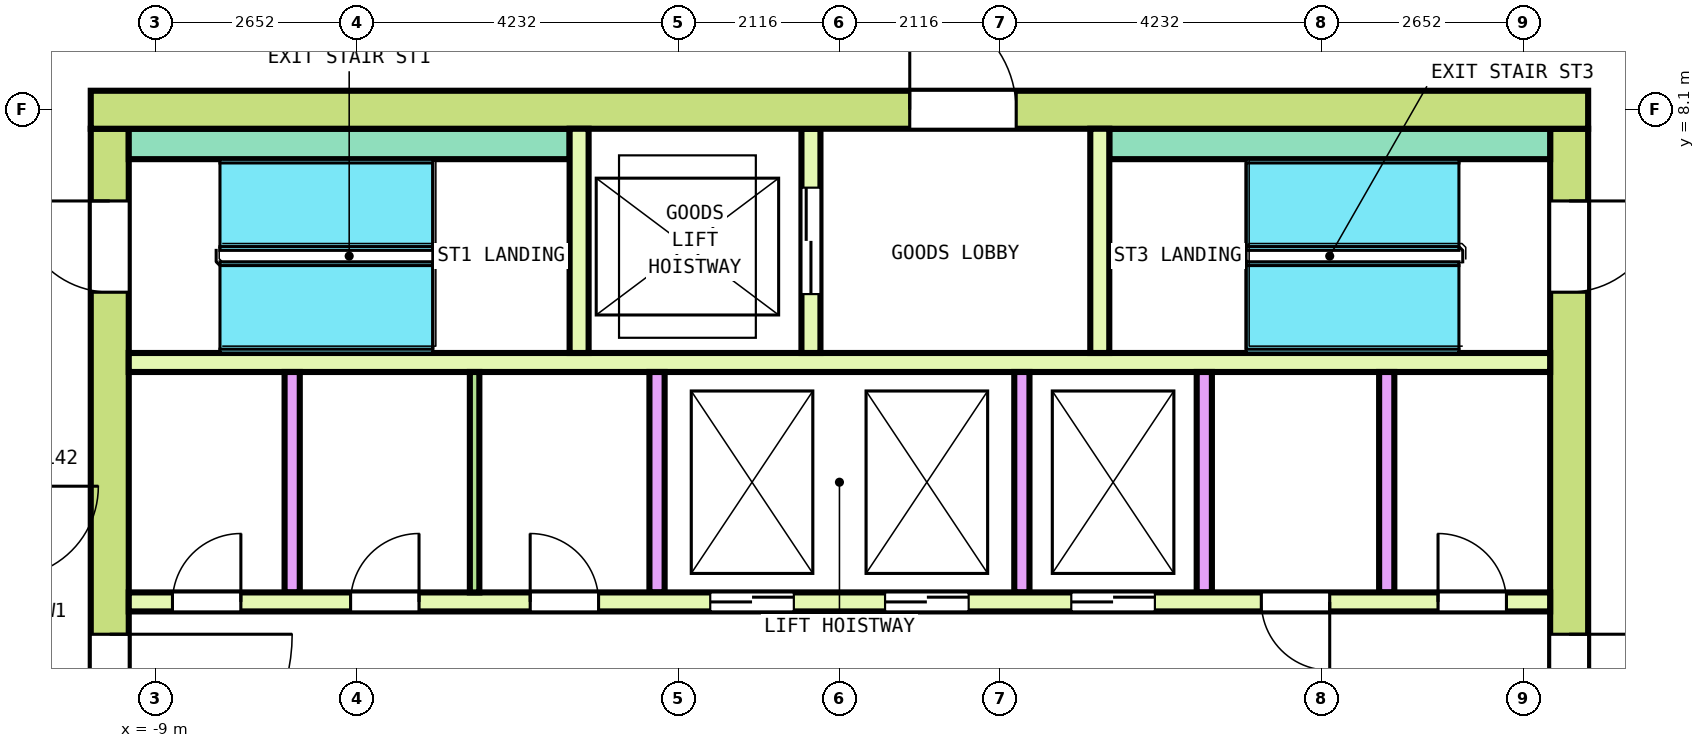
"""IFC4 building model, lengths in metres.
Left out: names, types, materials, properties, quantities, classifications, styles, units other than length and angle.
Written with IfcOpenShell. Run it as: python <this file> out.ifc"""

import sys

from ifc_helpers import new_model, si_unit, direction, frame, frame_2d, origin, place, context, subcontext, project, spatial, rectangle, extrude, element, fill, save


model = new_model("IFC4")
c1 = context("Model", 3, precision=1e-05, world=origin(), true_north=direction((0.0, 1.0)))
c2 = subcontext(c1, "Body", "Model", "MODEL_VIEW")
j1 = project(units=[si_unit("LENGTHUNIT", "METRE"), si_unit("PLANEANGLEUNIT", "RADIAN")], contexts=[c1])
p1 = place(None, origin())
s1 = spatial("IfcSite", under=j1, at=p1, CompositionType="ELEMENT")
p2 = place(p1, origin())
s2 = spatial("IfcBuilding", under=s1, at=p2, CompositionType="ELEMENT")
p3 = place(p2, frame((0.0, 0.0, 271.0)))
s3 = spatial("IfcBuildingStorey", under=s2, at=p3, CompositionType="ELEMENT", Elevation=271.0)
p4 = place(p3, frame((-9.85, 8.1, 0.0), z_axis=(0.0, 0.0, 1.0), x_axis=(1.0, 0.0, 0.0)))
e1 = element("IfcWall", 1, at=p4, inside=s3, PredefinedType="SHEAR", context=c2, shape_type="SweptSolid", body=[
    extrude(rectangle(XDim=19.7, YDim=0.5, at=frame_2d((9.85, 0.0))), origin(), (0.0, 0.0, 1.0), 3.7),
])
p5 = place(p4, frame((10.775, 0.0, 0.0)))
e2 = element("IfcOpeningElement", 2, at=p5, cuts=e1, PredefinedType="OPENING", context=c2, shape_type="SweptSolid", body=[
    extrude(rectangle(XDim=1.4, YDim=2.1, at=frame_2d((0.7, 1.05))), frame((0.0, 0.26, 0.0), z_axis=(0.0, -1.0, 0.0), x_axis=(1.0, 0.0, 0.0)), (0.0, 0.0, 1.0), 0.52),
])
p6 = place(p3, frame((-9.6, -7.85, 0.0), z_axis=(0.0, 0.0, 1.0), x_axis=(0.0, 1.0, 0.0)))
e3 = element("IfcWall", 3, at=p6, inside=s3, PredefinedType="SHEAR", context=c2, shape_type="SweptSolid", body=[
    extrude(rectangle(XDim=15.7, YDim=0.5, at=frame_2d((7.85, 0.0))), origin(), (0.0, 0.0, 1.0), 3.7),
])
p7 = place(p6, frame((6.65, 0.0, 0.0)))
e4 = element("IfcOpeningElement", 4, at=p7, cuts=e3, PredefinedType="OPENING", context=c2, shape_type="SweptSolid", body=[
    extrude(rectangle(XDim=2.4, YDim=2.1, at=frame_2d((1.2, 1.05))), frame((0.0, 0.26, 0.0), z_axis=(0.0, -1.0, 0.0), x_axis=(1.0, 0.0, 0.0)), (0.0, 0.0, 1.0), 0.52),
])
p8 = place(p6, frame((13.55, 0.0, 0.0)))
e5 = element("IfcOpeningElement", 5, at=p8, cuts=e3, PredefinedType="OPENING", context=c2, shape_type="SweptSolid", body=[
    extrude(rectangle(XDim=1.2, YDim=2.1, at=frame_2d((0.6, 1.05))), frame((0.0, 0.26, 0.0), z_axis=(0.0, -1.0, 0.0), x_axis=(1.0, 0.0, 0.0)), (0.0, 0.0, 1.0), 0.52),
])
p9 = place(p6, frame((0.95, 0.0, 0.0)))
e6 = element("IfcOpeningElement", 6, at=p9, cuts=e3, PredefinedType="OPENING", context=c2, shape_type="SweptSolid", body=[
    extrude(rectangle(XDim=1.2, YDim=2.1, at=frame_2d((0.6, 1.05))), frame((0.0, 0.26, 0.0), z_axis=(0.0, -1.0, 0.0), x_axis=(1.0, 0.0, 0.0)), (0.0, 0.0, 1.0), 0.52),
])
p10 = place(p3, frame((9.6, -7.85, 0.0), z_axis=(0.0, 0.0, 1.0), x_axis=(0.0, 1.0, 0.0)))
e7 = element("IfcWall", 7, at=p10, inside=s3, PredefinedType="SHEAR", context=c2, shape_type="SweptSolid", body=[
    extrude(rectangle(XDim=15.7, YDim=0.5, at=frame_2d((7.85, 0.0))), origin(), (0.0, 0.0, 1.0), 3.7),
])
p11 = place(p10, frame((6.65, 0.0, 0.0)))
e8 = element("IfcOpeningElement", 8, at=p11, cuts=e7, PredefinedType="OPENING", context=c2, shape_type="SweptSolid", body=[
    extrude(rectangle(XDim=2.4, YDim=2.1, at=frame_2d((1.2, 1.05))), frame((0.0, 0.26, 0.0), z_axis=(0.0, -1.0, 0.0), x_axis=(1.0, 0.0, 0.0)), (0.0, 0.0, 1.0), 0.52),
])
p12 = place(p10, frame((13.55, 0.0, 0.0)))
e9 = element("IfcOpeningElement", 9, at=p12, cuts=e7, PredefinedType="OPENING", context=c2, shape_type="SweptSolid", body=[
    extrude(rectangle(XDim=1.2, YDim=2.1, at=frame_2d((0.6, 1.05))), frame((0.0, 0.26, 0.0), z_axis=(0.0, -1.0, 0.0), x_axis=(1.0, 0.0, 0.0)), (0.0, 0.0, 1.0), 0.52),
])
p13 = place(p10, frame((1.05, 0.0, 0.0)))
e10 = element("IfcOpeningElement", 10, at=p13, cuts=e7, PredefinedType="OPENING", context=c2, shape_type="SweptSolid", body=[
    extrude(rectangle(XDim=1.0, YDim=2.1, at=frame_2d((0.5, 1.05))), frame((0.0, 0.26, 0.0), z_axis=(0.0, -1.0, 0.0), x_axis=(1.0, 0.0, 0.0)), (0.0, 0.0, 1.0), 0.52),
])
p14 = place(p3, frame((-9.35, 1.625, 0.0), z_axis=(0.0, 0.0, 1.0), x_axis=(1.0, 0.0, 0.0)))
e11 = element("IfcWall", 11, at=p14, inside=s3, PredefinedType="SOLIDWALL", context=c2, shape_type="SweptSolid", body=[
    extrude(rectangle(XDim=18.7, YDim=0.25, at=frame_2d((9.35, 0.0))), origin(), (0.0, 0.0, 1.0), 3.7),
])
p15 = place(p14, frame((7.65, 0.0, 0.0)))
e12 = element("IfcOpeningElement", 12, at=p15, cuts=e11, PredefinedType="OPENING", context=c2, shape_type="SweptSolid", body=[
    extrude(rectangle(XDim=1.1, YDim=2.1, at=frame_2d((0.55, 1.05))), frame((0.0, 0.135, 0.0), z_axis=(0.0, -1.0, 0.0), x_axis=(1.0, 0.0, 0.0)), (0.0, 0.0, 1.0), 0.27),
])
p16 = place(p14, frame((9.95, 0.0, 0.0)))
e13 = element("IfcOpeningElement", 13, at=p16, cuts=e11, PredefinedType="OPENING", context=c2, shape_type="SweptSolid", body=[
    extrude(rectangle(XDim=1.1, YDim=2.1, at=frame_2d((0.55, 1.05))), frame((0.0, 0.135, 0.0), z_axis=(0.0, -1.0, 0.0), x_axis=(1.0, 0.0, 0.0)), (0.0, 0.0, 1.0), 0.27),
])
p17 = place(p14, frame((12.4, 0.0, 0.0)))
e14 = element("IfcOpeningElement", 14, at=p17, cuts=e11, PredefinedType="OPENING", context=c2, shape_type="SweptSolid", body=[
    extrude(rectangle(XDim=1.1, YDim=2.1, at=frame_2d((0.55, 1.05))), frame((0.0, 0.135, 0.0), z_axis=(0.0, -1.0, 0.0), x_axis=(1.0, 0.0, 0.0)), (0.0, 0.0, 1.0), 0.27),
])
p18 = place(p14, frame((0.575, 0.0, 0.0)))
e15 = element("IfcOpeningElement", 15, at=p18, cuts=e11, PredefinedType="OPENING", context=c2, shape_type="SweptSolid", body=[
    extrude(rectangle(XDim=0.9, YDim=2.1, at=frame_2d((0.45, 1.05))), frame((0.0, 0.135, 0.0), z_axis=(0.0, -1.0, 0.0), x_axis=(1.0, 0.0, 0.0)), (0.0, 0.0, 1.0), 0.27),
])
p19 = place(p14, frame((2.919, 0.0, 0.0)))
e16 = element("IfcOpeningElement", 16, at=p19, cuts=e11, PredefinedType="OPENING", context=c2, shape_type="SweptSolid", body=[
    extrude(rectangle(XDim=0.9, YDim=2.1, at=frame_2d((0.45, 1.05))), frame((0.0, 0.135, 0.0), z_axis=(0.0, -1.0, 0.0), x_axis=(1.0, 0.0, 0.0)), (0.0, 0.0, 1.0), 0.27),
])
p20 = place(p14, frame((5.281, 0.0, 0.0)))
e17 = element("IfcOpeningElement", 17, at=p20, cuts=e11, PredefinedType="OPENING", context=c2, shape_type="SweptSolid", body=[
    extrude(rectangle(XDim=0.9, YDim=2.1, at=frame_2d((0.45, 1.05))), frame((0.0, 0.135, 0.0), z_axis=(0.0, -1.0, 0.0), x_axis=(1.0, 0.0, 0.0)), (0.0, 0.0, 1.0), 0.27),
])
p21 = place(p14, frame((14.9, 0.0, 0.0)))
e18 = element("IfcOpeningElement", 18, at=p21, cuts=e11, PredefinedType="OPENING", context=c2, shape_type="SweptSolid", body=[
    extrude(rectangle(XDim=0.9, YDim=2.1, at=frame_2d((0.45, 1.05))), frame((0.0, 0.135, 0.0), z_axis=(0.0, -1.0, 0.0), x_axis=(1.0, 0.0, 0.0)), (0.0, 0.0, 1.0), 0.27),
])
p22 = place(p14, frame((17.225, 0.0, 0.0)))
e19 = element("IfcOpeningElement", 19, at=p22, cuts=e11, PredefinedType="OPENING", context=c2, shape_type="SweptSolid", body=[
    extrude(rectangle(XDim=0.9, YDim=2.1, at=frame_2d((0.45, 1.05))), frame((0.0, 0.135, 0.0), z_axis=(0.0, -1.0, 0.0), x_axis=(1.0, 0.0, 0.0)), (0.0, 0.0, 1.0), 0.27),
])
p23 = place(p3, frame((-9.35, 4.775, 0.0), z_axis=(0.0, 0.0, 1.0), x_axis=(1.0, 0.0, 0.0)))
e20 = element("IfcWall", 20, at=p23, inside=s3, PredefinedType="SOLIDWALL", context=c2, shape_type="SweptSolid", body=[
    extrude(rectangle(XDim=18.7, YDim=0.25, at=frame_2d((9.35, 0.0))), origin(), (0.0, 0.0, 1.0), 3.7),
])
for number, where, z_axis, x_axis in (
    (21, (-7.2, 1.75, 0.0), (0.0, 0.0, 1.0), (0.0, 1.0, 0.0)),
    (22, (-2.4, 1.75, 0.0), (0.0, 0.0, 1.0), (0.0, 1.0, 0.0)),
    (23, (2.4, 1.75, 0.0), (0.0, 0.0, 1.0), (0.0, 1.0, 0.0)),
    (24, (4.8, 1.75, 0.0), (0.0, 0.0, 1.0), (0.0, 1.0, 0.0)),
    (25, (7.2, 1.75, 0.0), (0.0, 0.0, 1.0), (0.0, 1.0, 0.0)),
):
    element("IfcWall", number, at=place(p3, frame(where, z_axis=z_axis, x_axis=x_axis)), inside=s3, PredefinedType="SOLIDWALL", context=c2, shape_type="SweptSolid", body=[
        extrude(rectangle(XDim=2.9, YDim=0.2, at=frame_2d((1.45, 0.0))), origin(), (0.0, 0.0, 1.0), 3.7),
    ])
for number, where, z_axis, x_axis in (
    (26, (-9.35, 7.65, 0.0), (0.0, 0.0, 1.0), (1.0, 0.0, 0.0)),
    (27, (3.55, 7.65, 0.0), (0.0, 0.0, 1.0), (1.0, 0.0, 0.0)),
):
    element("IfcWall", number, at=place(p3, frame(where, z_axis=z_axis, x_axis=x_axis)), inside=s3, PredefinedType="SOLIDWALL", context=c2, shape_type="SweptSolid", body=[
        extrude(rectangle(XDim=5.8, YDim=0.4, at=frame_2d((2.9, 0.0))), origin(), (0.0, 0.0, 1.0), 3.7),
    ])
p24 = place(p3, frame((-3.425, 4.9, 0.0), z_axis=(0.0, 0.0, 1.0), x_axis=(0.0, 1.0, 0.0)))
e28 = element("IfcWall", 28, at=p24, inside=s3, PredefinedType="SOLIDWALL", context=c2, shape_type="SweptSolid", body=[
    extrude(rectangle(XDim=2.95, YDim=0.25, at=frame_2d((1.475, 0.0))), origin(), (0.0, 0.0, 1.0), 3.7),
])
p25 = place(p3, frame((-0.375, 4.9, 0.0), z_axis=(0.0, 0.0, 1.0), x_axis=(0.0, 1.0, 0.0)))
e29 = element("IfcWall", 29, at=p25, inside=s3, PredefinedType="SOLIDWALL", context=c2, shape_type="SweptSolid", body=[
    extrude(rectangle(XDim=2.95, YDim=0.25, at=frame_2d((1.475, 0.0))), origin(), (0.0, 0.0, 1.0), 3.7),
])
p26 = place(p25, frame((0.775, 0.0, 0.0)))
e30 = element("IfcOpeningElement", 30, at=p26, cuts=e29, PredefinedType="OPENING", context=c2, shape_type="SweptSolid", body=[
    extrude(rectangle(XDim=1.4, YDim=2.1, at=frame_2d((0.7, 1.05))), frame((0.0, 0.135, 0.0), z_axis=(0.0, -1.0, 0.0), x_axis=(1.0, 0.0, 0.0)), (0.0, 0.0, 1.0), 0.27),
])
p27 = place(p3, frame((3.425, 4.9, 0.0), z_axis=(0.0, 0.0, 1.0), x_axis=(0.0, 1.0, 0.0)))
e31 = element("IfcWall", 31, at=p27, inside=s3, PredefinedType="SOLIDWALL", context=c2, shape_type="SweptSolid", body=[
    extrude(rectangle(XDim=2.95, YDim=0.25, at=frame_2d((1.475, 0.0))), origin(), (0.0, 0.0, 1.0), 3.7),
])
p28 = place(p3, frame((-4.8, 1.75, 0.0), z_axis=(0.0, 0.0, 1.0), x_axis=(0.0, 1.0, 0.0)))
e32 = element("IfcWall", 32, at=p28, inside=s3, PredefinedType="PARTITIONING", context=c2, shape_type="SweptSolid", body=[
    extrude(rectangle(XDim=2.9, YDim=0.125, at=frame_2d((1.45, 0.0))), origin(), (0.0, 0.0, 1.0), 3.7),
])
p29 = place(p15, origin())
e33 = element("IfcDoor", 33, at=p29, inside=s3, OperationType="DOUBLE_DOOR_SLIDING", PredefinedType="DOOR", context=c2, shape_type="SweptSolid", body=[
    extrude(rectangle(XDim=1.1, YDim=2.1, at=frame_2d((0.55, 1.05))), frame((0.0, 0.075, 0.0), z_axis=(0.0, -1.0, 0.0), x_axis=(1.0, 0.0, 0.0)), (0.0, 0.0, 1.0), 0.15),
])
fill(e12, e33)
p30 = place(p16, origin())
e34 = element("IfcDoor", 34, at=p30, inside=s3, OperationType="DOUBLE_DOOR_SLIDING", PredefinedType="DOOR", context=c2, shape_type="SweptSolid", body=[
    extrude(rectangle(XDim=1.1, YDim=2.1, at=frame_2d((0.55, 1.05))), frame((0.0, 0.075, 0.0), z_axis=(0.0, -1.0, 0.0), x_axis=(1.0, 0.0, 0.0)), (0.0, 0.0, 1.0), 0.15),
])
fill(e13, e34)
p31 = place(p17, origin())
e35 = element("IfcDoor", 35, at=p31, inside=s3, OperationType="DOUBLE_DOOR_SLIDING", PredefinedType="DOOR", context=c2, shape_type="SweptSolid", body=[
    extrude(rectangle(XDim=1.1, YDim=2.1, at=frame_2d((0.55, 1.05))), frame((0.0, 0.075, 0.0), z_axis=(0.0, -1.0, 0.0), x_axis=(1.0, 0.0, 0.0)), (0.0, 0.0, 1.0), 0.15),
])
fill(e14, e35)
p32 = place(p26, origin())
e36 = element("IfcDoor", 36, at=p32, inside=s3, OperationType="DOUBLE_DOOR_SLIDING", PredefinedType="DOOR", context=c2, shape_type="SweptSolid", body=[
    extrude(rectangle(XDim=1.4, YDim=2.1, at=frame_2d((0.7, 1.05))), frame((0.0, 0.075, 0.0), z_axis=(0.0, -1.0, 0.0), x_axis=(1.0, 0.0, 0.0)), (0.0, 0.0, 1.0), 0.15),
])
fill(e30, e36)
p33 = place(p7, origin())
e37 = element("IfcDoor", 37, at=p33, inside=s3, OperationType="DOUBLE_DOOR_SINGLE_SWING", PredefinedType="DOOR", context=c2, shape_type="SweptSolid", body=[
    extrude(rectangle(XDim=2.4, YDim=2.1, at=frame_2d((1.2, 1.05))), frame((0.0, 0.2, 0.0), z_axis=(0.0, -1.0, 0.0), x_axis=(1.0, 0.0, 0.0)), (0.0, 0.0, 1.0), 0.4),
])
fill(e4, e37)
p34 = place(p11, origin())
e38 = element("IfcDoor", 38, at=p34, inside=s3, OperationType="DOUBLE_DOOR_SINGLE_SWING", PredefinedType="DOOR", context=c2, shape_type="SweptSolid", body=[
    extrude(rectangle(XDim=2.4, YDim=2.1, at=frame_2d((1.2, 1.05))), frame((0.0, 0.2, 0.0), z_axis=(0.0, -1.0, 0.0), x_axis=(1.0, 0.0, 0.0)), (0.0, 0.0, 1.0), 0.4),
])
fill(e8, e38)
p35 = place(p8, origin())
e39 = element("IfcDoor", 39, at=p35, inside=s3, OperationType="SINGLE_SWING_RIGHT", PredefinedType="DOOR", context=c2, shape_type="SweptSolid", body=[
    extrude(rectangle(XDim=1.2, YDim=2.1, at=frame_2d((0.6, 1.05))), frame((0.0, 0.2, 0.0), z_axis=(0.0, -1.0, 0.0), x_axis=(1.0, 0.0, 0.0)), (0.0, 0.0, 1.0), 0.4),
])
fill(e5, e39)
p36 = place(p12, origin())
e40 = element("IfcDoor", 40, at=p36, inside=s3, OperationType="SINGLE_SWING_RIGHT", PredefinedType="DOOR", context=c2, shape_type="SweptSolid", body=[
    extrude(rectangle(XDim=1.2, YDim=2.1, at=frame_2d((0.6, 1.05))), frame((0.0, 0.2, 0.0), z_axis=(0.0, -1.0, 0.0), x_axis=(1.0, 0.0, 0.0)), (0.0, 0.0, 1.0), 0.4),
])
fill(e9, e40)
p37 = place(p5, origin())
e41 = element("IfcDoor", 41, at=p37, inside=s3, OperationType="DOUBLE_DOOR_SINGLE_SWING", PredefinedType="DOOR", context=c2, shape_type="SweptSolid", body=[
    extrude(rectangle(XDim=1.4, YDim=2.1, at=frame_2d((0.7, 1.05))), frame((0.0, 0.2, 0.0), z_axis=(0.0, -1.0, 0.0), x_axis=(1.0, 0.0, 0.0)), (0.0, 0.0, 1.0), 0.4),
])
fill(e2, e41)
p38 = place(p18, origin())
e42 = element("IfcDoor", 42, at=p38, inside=s3, OperationType="SINGLE_SWING_RIGHT", PredefinedType="DOOR", context=c2, shape_type="SweptSolid", body=[
    extrude(rectangle(XDim=0.9, YDim=2.1, at=frame_2d((0.45, 1.05))), frame((0.0, 0.075, 0.0), z_axis=(0.0, -1.0, 0.0), x_axis=(1.0, 0.0, 0.0)), (0.0, 0.0, 1.0), 0.15),
])
fill(e15, e42)
p39 = place(p19, origin())
e43 = element("IfcDoor", 43, at=p39, inside=s3, OperationType="SINGLE_SWING_LEFT", PredefinedType="DOOR", context=c2, shape_type="SweptSolid", body=[
    extrude(rectangle(XDim=0.9, YDim=2.1, at=frame_2d((0.45, 1.05))), frame((0.0, 0.075, 0.0), z_axis=(0.0, -1.0, 0.0), x_axis=(1.0, 0.0, 0.0)), (0.0, 0.0, 1.0), 0.15),
])
fill(e16, e43)
p40 = place(p20, origin())
e44 = element("IfcDoor", 44, at=p40, inside=s3, OperationType="SINGLE_SWING_RIGHT", PredefinedType="DOOR", context=c2, shape_type="SweptSolid", body=[
    extrude(rectangle(XDim=0.9, YDim=2.1, at=frame_2d((0.45, 1.05))), frame((0.0, 0.075, 0.0), z_axis=(0.0, -1.0, 0.0), x_axis=(1.0, 0.0, 0.0)), (0.0, 0.0, 1.0), 0.15),
])
fill(e17, e44)
p41 = place(p21, origin())
e45 = element("IfcDoor", 45, at=p41, inside=s3, OperationType="SINGLE_SWING_LEFT", PredefinedType="DOOR", context=c2, shape_type="SweptSolid", body=[
    extrude(rectangle(XDim=0.9, YDim=2.1, at=frame_2d((0.45, 1.05))), frame((0.0, 0.075, 0.0), z_axis=(0.0, -1.0, 0.0), x_axis=(1.0, 0.0, 0.0)), (0.0, 0.0, 1.0), 0.15),
])
fill(e18, e45)
p42 = place(p22, origin())
e46 = element("IfcDoor", 46, at=p42, inside=s3, OperationType="SINGLE_SWING_RIGHT", PredefinedType="DOOR", context=c2, shape_type="SweptSolid", body=[
    extrude(rectangle(XDim=0.9, YDim=2.1, at=frame_2d((0.45, 1.05))), frame((0.0, 0.075, 0.0), z_axis=(0.0, -1.0, 0.0), x_axis=(1.0, 0.0, 0.0)), (0.0, 0.0, 1.0), 0.15),
])
fill(e19, e46)
save(model, sys.argv[1])
